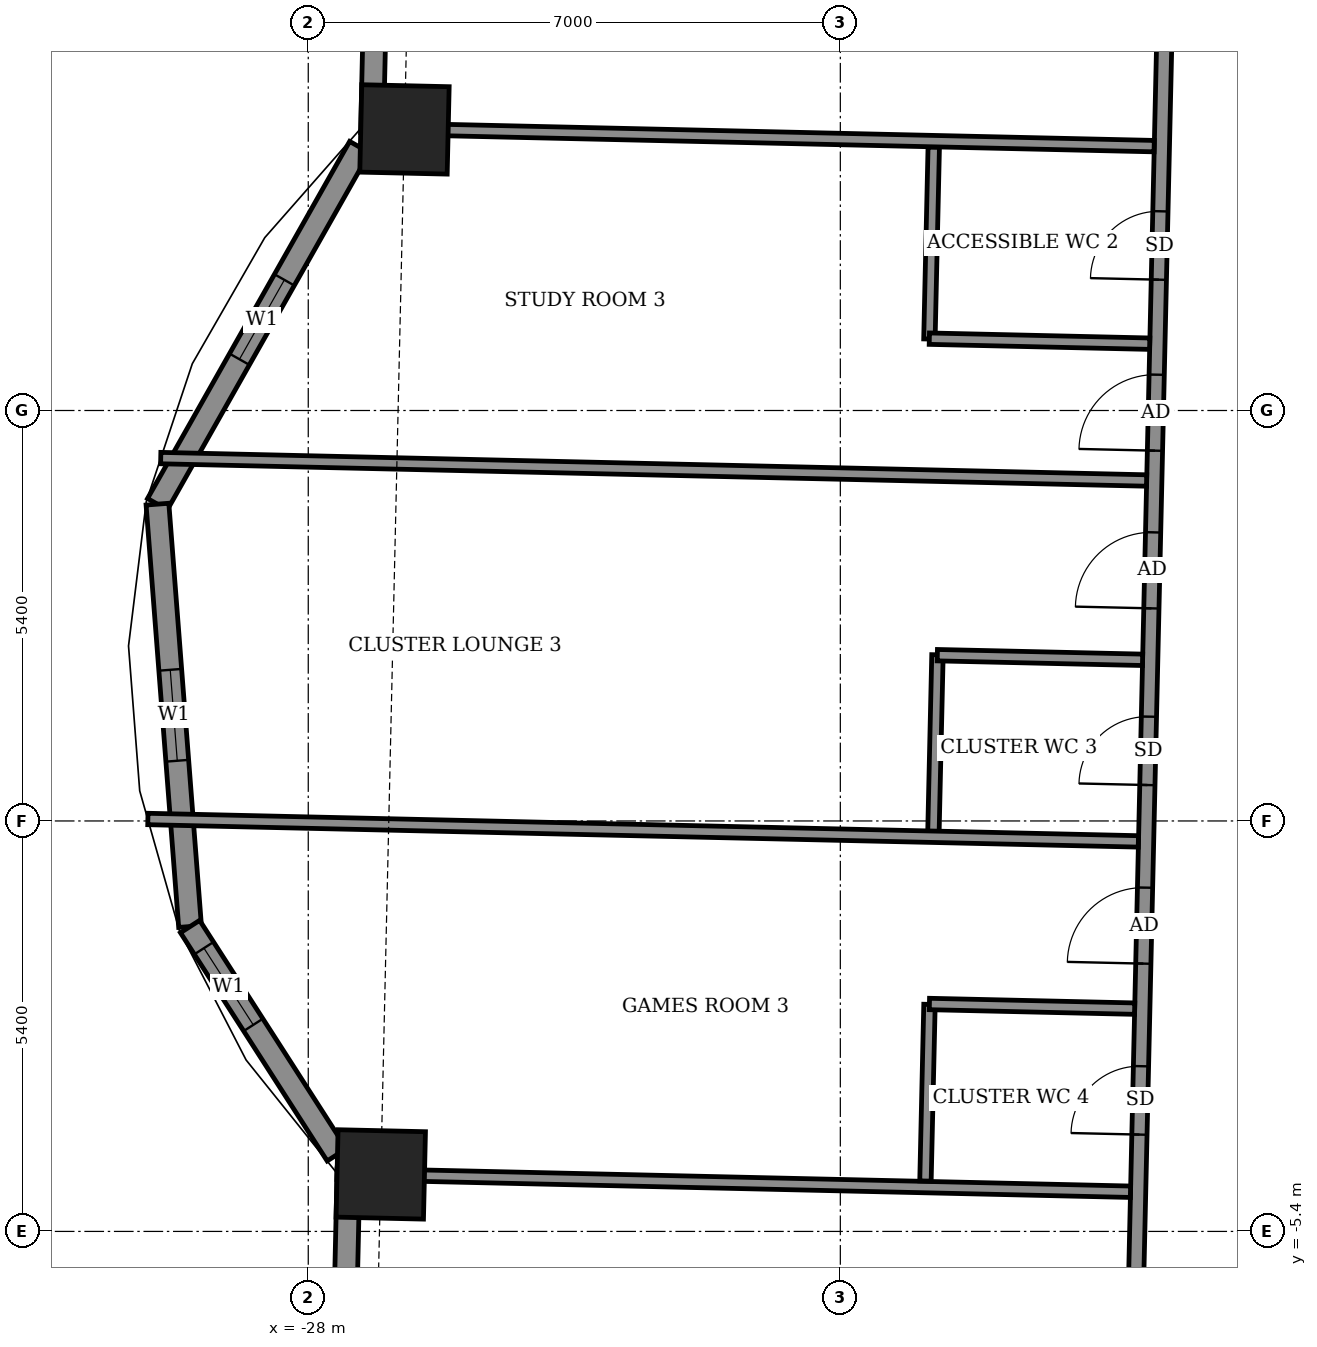
"""IFC4 building model, lengths in metres.
Left out: names, types, materials, properties, quantities, classifications, styles, units other than length and angle.
Written with IfcOpenShell. Run it as: python <this file> out.ifc"""

import sys

from ifc_helpers import new_model, si_unit, direction, frame, frame_2d, origin, origin_2d, place, context, subcontext, project, spatial, rectangle, extrude, element, fill, save


model = new_model("IFC4")
c1 = context("Model", 3, precision=1e-05, world=origin(), true_north=direction((0.0, 1.0)))
c2 = subcontext(c1, "Body", "Model", "MODEL_VIEW")
j1 = project(units=[si_unit("LENGTHUNIT", "METRE"), si_unit("PLANEANGLEUNIT", "RADIAN")], contexts=[c1])
p1 = place(None, origin())
s1 = spatial("IfcSite", under=j1, at=p1, CompositionType="ELEMENT")
p2 = place(p1, origin())
s2 = spatial("IfcBuilding", under=s1, at=p2, CompositionType="ELEMENT")
p3 = place(p2, frame((0.0, 0.0, 201.5)))
s3 = spatial("IfcBuildingStorey", under=s2, at=p3, CompositionType="ELEMENT", Elevation=201.5)
for number, where, z_axis, x_axis in (
    (1, (-27.046, -4.65, -0.55), (0.0, 0.0, 1.0), (-0.023, -1.0, 0.0)),
    (2, (-26.734, 9.098, -0.55), (0.0, 0.0, 1.0), (-0.023, -1.0, 0.0)),
):
    element("IfcColumn", number, at=place(p3, frame(where, z_axis=z_axis, x_axis=x_axis)), inside=s3, PredefinedType="COLUMN", context=c2, shape_type="SweptSolid", body=[
        extrude(rectangle(XDim=1.15, YDim=1.15, at=origin_2d()), origin(), (0.0, 0.0, 1.0), 3.6),
    ])
p4 = place(p3, frame((-26.904, 20.379, 0.0), z_axis=(0.0, 0.0, 1.0), x_axis=(-0.022669030322, -0.999743024514, 0.0)))
e3 = element("IfcWall", 3, at=p4, inside=s3, PredefinedType="SOLIDWALL", context=c2, shape_type="SweptSolid", body=[
    extrude(rectangle(XDim=11.33, YDim=0.3, at=frame_2d((5.665, 0.0))), origin(), (0.0, 0.0, 1.0), 2.55),
])
p5 = place(p4, frame((1.603, 0.0, 0.0)))
e4 = element("IfcOpeningElement", 4, at=p5, cuts=e3, PredefinedType="OPENING", context=c2, shape_type="SweptSolid", body=[
    extrude(rectangle(XDim=1.5, YDim=2.4, at=frame_2d((0.75, 1.2))), frame((0.0, 0.16, 0.0), z_axis=(0.0, -1.0, 0.0), x_axis=(1.0, 0.0, 0.0)), (0.0, 0.0, 1.0), 0.32),
])
p6 = place(p4, frame((7.218, 0.0, 0.9)))
e5 = element("IfcOpeningElement", 5, at=p6, cuts=e3, PredefinedType="OPENING", context=c2, shape_type="SweptSolid", body=[
    extrude(rectangle(XDim=2.4, YDim=1.5, at=frame_2d((1.2, 0.75))), frame((0.0, 0.16, 0.0), z_axis=(0.0, -1.0, 0.0), x_axis=(1.0, 0.0, 0.0)), (0.0, 0.0, 1.0), 0.32),
])
p7 = place(p3, frame((-27.325, 8.866, 0.0), z_axis=(0.0, 0.0, 1.0), x_axis=(-0.492554919955, -0.870281363025, 0.0)))
e6 = element("IfcWall", 6, at=p7, inside=s3, PredefinedType="SOLIDWALL", context=c2, shape_type="SweptSolid", body=[
    extrude(rectangle(XDim=5.398, YDim=0.3, at=frame_2d((2.699, 0.0))), origin(), (0.0, 0.0, 1.0), 3.05),
])
p8 = place(p7, frame((2.008, 0.0, 0.9)))
e7 = element("IfcOpeningElement", 7, at=p8, cuts=e6, PredefinedType="OPENING", context=c2, shape_type="SweptSolid", body=[
    extrude(rectangle(XDim=1.2, YDim=1.5, at=frame_2d((0.6, 0.75))), frame((0.0, 0.16, 0.0), z_axis=(0.0, -1.0, 0.0), x_axis=(1.0, 0.0, 0.0)), (0.0, 0.0, 1.0), 0.32),
])
p9 = place(p3, frame((-29.984, 4.168, 0.0), z_axis=(0.0, 0.0, 1.0), x_axis=(0.076964476481, -0.997033835614, 0.0)))
e8 = element("IfcWall", 8, at=p9, inside=s3, PredefinedType="SOLIDWALL", context=c2, shape_type="SweptSolid", body=[
    extrude(rectangle(XDim=5.573, YDim=0.3, at=frame_2d((2.787, 0.0))), origin(), (0.0, 0.0, 1.0), 3.05),
])
p10 = place(p9, frame((2.186, 0.0, 0.9)))
e9 = element("IfcOpeningElement", 9, at=p10, cuts=e8, PredefinedType="OPENING", context=c2, shape_type="SweptSolid", body=[
    extrude(rectangle(XDim=1.2, YDim=1.5, at=frame_2d((0.6, 0.75))), frame((0.0, 0.16, 0.0), z_axis=(0.0, -1.0, 0.0), x_axis=(1.0, 0.0, 0.0)), (0.0, 0.0, 1.0), 0.32),
])
p11 = place(p3, frame((-29.555, -1.389, 0.0), z_axis=(0.0, 0.0, 1.0), x_axis=(0.540622779574, -0.8412651248, 0.0)))
e10 = element("IfcWall", 10, at=p11, inside=s3, PredefinedType="SOLIDWALL", context=c2, shape_type="SweptSolid", body=[
    extrude(rectangle(XDim=3.57, YDim=0.3, at=frame_2d((1.785, 0.0))), origin(), (0.0, 0.0, 1.0), 3.05),
])
p12 = place(p11, frame((0.338, 0.0, 0.9)))
e11 = element("IfcOpeningElement", 11, at=p12, cuts=e10, PredefinedType="OPENING", context=c2, shape_type="SweptSolid", body=[
    extrude(rectangle(XDim=1.2, YDim=1.5, at=frame_2d((0.6, 0.75))), frame((0.0, 0.16, 0.0), z_axis=(0.0, -1.0, 0.0), x_axis=(1.0, 0.0, 0.0)), (0.0, 0.0, 1.0), 0.32),
])
p13 = place(p3, frame((-27.47, -4.585, 0.0), z_axis=(0.0, 0.0, 1.0), x_axis=(-0.022686419344, -0.999742630069, 0.0)))
e12 = element("IfcWall", 12, at=p13, inside=s3, PredefinedType="SOLIDWALL", context=c2, shape_type="SweptSolid", body=[
    extrude(rectangle(XDim=11.73, YDim=0.3, at=frame_2d((5.865, 0.0))), origin(), (0.0, 0.0, 1.0), 2.55),
])
p14 = place(p13, frame((2.261, 0.0, 0.0)))
e13 = element("IfcOpeningElement", 13, at=p14, cuts=e12, PredefinedType="OPENING", context=c2, shape_type="SweptSolid", body=[
    extrude(rectangle(XDim=1.5, YDim=2.4, at=frame_2d((0.75, 1.2))), frame((0.0, 0.16, 0.0), z_axis=(0.0, -1.0, 0.0), x_axis=(1.0, 0.0, 0.0)), (0.0, 0.0, 1.0), 0.32),
])
p15 = place(p13, frame((7.93, 0.0, 0.9)))
e14 = element("IfcOpeningElement", 14, at=p15, cuts=e12, PredefinedType="OPENING", context=c2, shape_type="SweptSolid", body=[
    extrude(rectangle(XDim=2.4, YDim=1.5, at=frame_2d((1.2, 0.75))), frame((0.0, 0.16, 0.0), z_axis=(0.0, -1.0, 0.0), x_axis=(1.0, 0.0, 0.0)), (0.0, 0.0, 1.0), 0.32),
])
p16 = place(p3, frame((-30.307, -7.701, 0.0), z_axis=(0.0, 0.0, 1.0), x_axis=(0.022929749512, 0.99973707873, 0.0)))
e15 = element("IfcWall", 15, at=p16, inside=s3, PredefinedType="USERDEFINED", context=c2, shape_type="SweptSolid", body=[
    extrude(rectangle(XDim=2.875, YDim=0.55, at=frame_2d((1.438, 0.0))), origin(), (0.0, 0.0, 1.0), 0.8),
])
p17 = place(p3, frame((-17.247, -12.149, 0.0), z_axis=(0.0, 0.0, 1.0), x_axis=(0.022698146637, 0.999742363881, 0.0)))
e16 = element("IfcWall", 16, at=p17, inside=s3, PredefinedType="PARTITIONING", context=c2, shape_type="SweptSolid", body=[
    extrude(rectangle(XDim=28.374, YDim=0.2, at=frame_2d((14.187, 0.0))), origin(), (0.0, 0.0, 1.0), 3.05),
])
p18 = place(p17, frame((23.0, 0.0, 0.0)))
e17 = element("IfcOpeningElement", 17, at=p18, cuts=e16, PredefinedType="OPENING", context=c2, shape_type="SweptSolid", body=[
    extrude(rectangle(XDim=1.0, YDim=2.1, at=frame_2d((0.5, 1.05))), frame((0.0, 0.11, 0.0), z_axis=(0.0, -1.0, 0.0), x_axis=(1.0, 0.0, 0.0)), (0.0, 0.0, 1.0), 0.22),
])
p19 = place(p17, frame((26.724, 0.0, 0.0)))
e18 = element("IfcOpeningElement", 18, at=p19, cuts=e16, PredefinedType="OPENING", context=c2, shape_type="SweptSolid", body=[
    extrude(rectangle(XDim=0.9, YDim=2.1, at=frame_2d((0.45, 1.05))), frame((0.0, 0.11, 0.0), z_axis=(0.0, -1.0, 0.0), x_axis=(1.0, 0.0, 0.0)), (0.0, 0.0, 1.0), 0.22),
])
p20 = place(p17, frame((17.025, 0.0, 0.0)))
e19 = element("IfcOpeningElement", 19, at=p20, cuts=e16, PredefinedType="OPENING", context=c2, shape_type="SweptSolid", body=[
    extrude(rectangle(XDim=1.0, YDim=2.1, at=frame_2d((0.5, 1.05))), frame((0.0, 0.11, 0.0), z_axis=(0.0, -1.0, 0.0), x_axis=(1.0, 0.0, 0.0)), (0.0, 0.0, 1.0), 0.22),
])
p21 = place(p17, frame((19.275, 0.0, 0.0)))
e20 = element("IfcOpeningElement", 20, at=p21, cuts=e16, PredefinedType="OPENING", context=c2, shape_type="SweptSolid", body=[
    extrude(rectangle(XDim=0.9, YDim=2.1, at=frame_2d((0.45, 1.05))), frame((0.0, 0.11, 0.0), z_axis=(0.0, -1.0, 0.0), x_axis=(1.0, 0.0, 0.0)), (0.0, 0.0, 1.0), 0.22),
])
p22 = place(p17, frame((14.95, 0.0, 0.0)))
e21 = element("IfcOpeningElement", 21, at=p22, cuts=e16, PredefinedType="OPENING", context=c2, shape_type="SweptSolid", body=[
    extrude(rectangle(XDim=1.0, YDim=2.1, at=frame_2d((0.5, 1.05))), frame((0.0, 0.11, 0.0), z_axis=(0.0, -1.0, 0.0), x_axis=(1.0, 0.0, 0.0)), (0.0, 0.0, 1.0), 0.22),
])
p23 = place(p17, frame((12.625, 0.0, 0.0)))
e22 = element("IfcOpeningElement", 22, at=p23, cuts=e16, PredefinedType="OPENING", context=c2, shape_type="SweptSolid", body=[
    extrude(rectangle(XDim=0.9, YDim=2.1, at=frame_2d((0.45, 1.05))), frame((0.0, 0.11, 0.0), z_axis=(0.0, -1.0, 0.0), x_axis=(1.0, 0.0, 0.0)), (0.0, 0.0, 1.0), 0.22),
])
p24 = place(p17, frame((10.275, 0.0, 0.0)))
e23 = element("IfcOpeningElement", 23, at=p24, cuts=e16, PredefinedType="OPENING", context=c2, shape_type="SweptSolid", body=[
    extrude(rectangle(XDim=1.0, YDim=2.1, at=frame_2d((0.5, 1.05))), frame((0.0, 0.11, 0.0), z_axis=(0.0, -1.0, 0.0), x_axis=(1.0, 0.0, 0.0)), (0.0, 0.0, 1.0), 0.22),
])
p25 = place(p17, frame((8.025, 0.0, 0.0)))
e24 = element("IfcOpeningElement", 24, at=p25, cuts=e16, PredefinedType="OPENING", context=c2, shape_type="SweptSolid", body=[
    extrude(rectangle(XDim=0.9, YDim=2.1, at=frame_2d((0.45, 1.05))), frame((0.0, 0.11, 0.0), z_axis=(0.0, -1.0, 0.0), x_axis=(1.0, 0.0, 0.0)), (0.0, 0.0, 1.0), 0.22),
])
p26 = place(p17, frame((4.337, 0.0, 0.0)))
e25 = element("IfcOpeningElement", 25, at=p26, cuts=e16, PredefinedType="OPENING", context=c2, shape_type="SweptSolid", body=[
    extrude(rectangle(XDim=1.0, YDim=2.1, at=frame_2d((0.5, 1.05))), frame((0.0, 0.11, 0.0), z_axis=(0.0, -1.0, 0.0), x_axis=(1.0, 0.0, 0.0)), (0.0, 0.0, 1.0), 0.22),
])
p27 = place(p17, frame((0.75, 0.0, 0.0)))
e26 = element("IfcOpeningElement", 26, at=p27, cuts=e16, PredefinedType="OPENING", context=c2, shape_type="SweptSolid", body=[
    extrude(rectangle(XDim=0.9, YDim=2.1, at=frame_2d((0.45, 1.05))), frame((0.0, 0.11, 0.0), z_axis=(0.0, -1.0, 0.0), x_axis=(1.0, 0.0, 0.0)), (0.0, 0.0, 1.0), 0.22),
])
p28 = place(p3, frame((-27.621, -4.641, 0.0), z_axis=(0.0, 0.0, 1.0), x_axis=(0.999742728106, -0.022682098664, 0.0)))
e27 = element("IfcWall", 27, at=p28, inside=s3, PredefinedType="PARTITIONING", context=c2, shape_type="SweptSolid", body=[
    extrude(rectangle(XDim=10.441, YDim=0.15, at=frame_2d((5.22, 0.0))), origin(), (0.0, 0.0, 1.0), 3.05),
])
p29 = place(p3, frame((-19.88, -4.737, 0.0), z_axis=(0.0, 0.0, 1.0), x_axis=(0.02279059109, 0.999740260747, 0.0)))
e28 = element("IfcWall", 28, at=p29, inside=s3, PredefinedType="PARTITIONING", context=c2, shape_type="SweptSolid", body=[
    extrude(rectangle(XDim=2.324, YDim=0.15, at=frame_2d((1.162, 0.0))), origin(), (0.0, 0.0, 1.0), 3.05),
])
p30 = place(p3, frame((-19.828, -2.408, 0.0), z_axis=(0.0, 0.0, 1.0), x_axis=(0.99974458177, -0.022600248254, 0.0)))
e29 = element("IfcWall", 29, at=p30, inside=s3, PredefinedType="PARTITIONING", context=c2, shape_type="SweptSolid", body=[
    extrude(rectangle(XDim=2.701, YDim=0.15, at=frame_2d((1.35, 0.0))), origin(), (0.0, 0.0, 1.0), 3.05),
])
p31 = place(p3, frame((-19.775, -0.138, 0.0), z_axis=(0.0, 0.0, 1.0), x_axis=(0.02279059109, 0.999740260747, 0.0)))
e30 = element("IfcWall", 30, at=p31, inside=s3, PredefinedType="PARTITIONING", context=c2, shape_type="SweptSolid", body=[
    extrude(rectangle(XDim=2.324, YDim=0.15, at=frame_2d((1.162, 0.0))), origin(), (0.0, 0.0, 1.0), 3.05),
])
p32 = place(p3, frame((-30.11, 0.026, 0.0), z_axis=(0.0, 0.0, 1.0), x_axis=(0.999743987427, -0.022626524343, 0.0)))
e31 = element("IfcWall", 31, at=p32, inside=s3, PredefinedType="PARTITIONING", context=c2, shape_type="SweptSolid", body=[
    extrude(rectangle(XDim=13.034, YDim=0.15, at=frame_2d((6.517, 0.0))), origin(), (0.0, 0.0, 1.0), 2.05),
])
p33 = place(p3, frame((-19.724, 2.181, 0.0), z_axis=(0.0, 0.0, 1.0), x_axis=(0.999746666054, -0.022507858937, 0.0)))
e32 = element("IfcWall", 32, at=p33, inside=s3, PredefinedType="PARTITIONING", context=c2, shape_type="SweptSolid", body=[
    extrude(rectangle(XDim=2.701, YDim=0.15, at=frame_2d((1.351, 0.0))), origin(), (0.0, 0.0, 1.0), 3.05),
])
p34 = place(p3, frame((-29.941, 4.774, 0.0), z_axis=(0.0, 0.0, 1.0), x_axis=(0.999741573163, -0.022732947207, 0.0)))
e33 = element("IfcWall", 33, at=p34, inside=s3, PredefinedType="PARTITIONING", context=c2, shape_type="SweptSolid", body=[
    extrude(rectangle(XDim=12.973, YDim=0.15, at=frame_2d((6.487, 0.0))), origin(), (0.0, 0.0, 1.0), 2.05),
])
p35 = place(p3, frame((-19.828, 6.34, 0.0), z_axis=(0.0, 0.0, 1.0), x_axis=(0.022532486354, 0.9997461113, 0.0)))
e34 = element("IfcWall", 34, at=p35, inside=s3, PredefinedType="PARTITIONING", context=c2, shape_type="SweptSolid", body=[
    extrude(rectangle(XDim=2.525, YDim=0.15, at=frame_2d((1.262, 0.0))), origin(), (0.0, 0.0, 1.0), 3.05),
])
p36 = place(p3, frame((-19.829, 6.345, 0.0), z_axis=(0.0, 0.0, 1.0), x_axis=(0.999741618182, -0.022730967319, 0.0)))
e35 = element("IfcWall", 35, at=p36, inside=s3, PredefinedType="PARTITIONING", context=c2, shape_type="SweptSolid", body=[
    extrude(rectangle(XDim=2.9, YDim=0.15, at=frame_2d((1.45, 0.0))), origin(), (0.0, 0.0, 1.0), 3.05),
])
p37 = place(p3, frame((-27.01, 9.108, 0.0), z_axis=(0.0, 0.0, 1.0), x_axis=(0.999742841246, -0.022677111331, 0.0)))
e36 = element("IfcWall", 36, at=p37, inside=s3, PredefinedType="PARTITIONING", context=c2, shape_type="SweptSolid", body=[
    extrude(rectangle(XDim=10.142, YDim=0.15, at=frame_2d((5.071, 0.0))), origin(), (0.0, 0.0, 1.0), 3.05),
])
p38 = place(p8, origin())
e37 = element("IfcWindow", 37, at=p38, inside=s3, PartitioningType="SINGLE_PANEL", PredefinedType="WINDOW", context=c2, shape_type="SweptSolid", body=[
    extrude(rectangle(XDim=1.2, YDim=1.5, at=frame_2d((0.6, 0.75))), frame((0.0, 0.03, 0.0), z_axis=(0.0, -1.0, 0.0), x_axis=(1.0, 0.0, 0.0)), (0.0, 0.0, 1.0), 0.06),
])
fill(e7, e37)
p39 = place(p10, origin())
e38 = element("IfcWindow", 38, at=p39, inside=s3, PartitioningType="SINGLE_PANEL", PredefinedType="WINDOW", context=c2, shape_type="SweptSolid", body=[
    extrude(rectangle(XDim=1.2, YDim=1.5, at=frame_2d((0.6, 0.75))), frame((0.0, 0.03, 0.0), z_axis=(0.0, -1.0, 0.0), x_axis=(1.0, 0.0, 0.0)), (0.0, 0.0, 1.0), 0.06),
])
fill(e9, e38)
p40 = place(p12, origin())
e39 = element("IfcWindow", 39, at=p40, inside=s3, PartitioningType="SINGLE_PANEL", PredefinedType="WINDOW", context=c2, shape_type="SweptSolid", body=[
    extrude(rectangle(XDim=1.2, YDim=1.5, at=frame_2d((0.6, 0.75))), frame((0.0, 0.03, 0.0), z_axis=(0.0, -1.0, 0.0), x_axis=(1.0, 0.0, 0.0)), (0.0, 0.0, 1.0), 0.06),
])
fill(e11, e39)
p41 = place(p20, origin())
e40 = element("IfcDoor", 40, at=p41, inside=s3, OperationType="SINGLE_SWING_RIGHT", PredefinedType="DOOR", context=c2, shape_type="SweptSolid", body=[
    extrude(rectangle(XDim=1.0, YDim=2.1, at=frame_2d((0.5, 1.05))), frame((0.0, 0.025, 0.0), z_axis=(0.0, -1.0, 0.0), x_axis=(1.0, 0.0, 0.0)), (0.0, 0.0, 1.0), 0.05),
])
fill(e19, e40)
p42 = place(p21, origin())
e41 = element("IfcDoor", 41, at=p42, inside=s3, OperationType="SINGLE_SWING_LEFT", PredefinedType="DOOR", context=c2, shape_type="SweptSolid", body=[
    extrude(rectangle(XDim=0.9, YDim=2.1, at=frame_2d((0.45, 1.05))), frame((0.0, 0.025, 0.0), z_axis=(0.0, -1.0, 0.0), x_axis=(1.0, 0.0, 0.0)), (0.0, 0.0, 1.0), 0.05),
])
fill(e20, e41)
p43 = place(p22, origin())
e42 = element("IfcDoor", 42, at=p43, inside=s3, OperationType="SINGLE_SWING_LEFT", PredefinedType="DOOR", context=c2, shape_type="SweptSolid", body=[
    extrude(rectangle(XDim=1.0, YDim=2.1, at=frame_2d((0.5, 1.05))), frame((0.0, 0.025, 0.0), z_axis=(0.0, -1.0, 0.0), x_axis=(1.0, 0.0, 0.0)), (0.0, 0.0, 1.0), 0.05),
])
fill(e21, e42)
p44 = place(p23, origin())
e43 = element("IfcDoor", 43, at=p44, inside=s3, OperationType="SINGLE_SWING_RIGHT", PredefinedType="DOOR", context=c2, shape_type="SweptSolid", body=[
    extrude(rectangle(XDim=0.9, YDim=2.1, at=frame_2d((0.45, 1.05))), frame((0.0, 0.025, 0.0), z_axis=(0.0, -1.0, 0.0), x_axis=(1.0, 0.0, 0.0)), (0.0, 0.0, 1.0), 0.05),
])
fill(e22, e43)
p45 = place(p24, origin())
e44 = element("IfcDoor", 44, at=p45, inside=s3, OperationType="SINGLE_SWING_RIGHT", PredefinedType="DOOR", context=c2, shape_type="SweptSolid", body=[
    extrude(rectangle(XDim=1.0, YDim=2.1, at=frame_2d((0.5, 1.05))), frame((0.0, 0.025, 0.0), z_axis=(0.0, -1.0, 0.0), x_axis=(1.0, 0.0, 0.0)), (0.0, 0.0, 1.0), 0.05),
])
fill(e23, e44)
p46 = place(p25, origin())
e45 = element("IfcDoor", 45, at=p46, inside=s3, OperationType="SINGLE_SWING_LEFT", PredefinedType="DOOR", context=c2, shape_type="SweptSolid", body=[
    extrude(rectangle(XDim=0.9, YDim=2.1, at=frame_2d((0.45, 1.05))), frame((0.0, 0.025, 0.0), z_axis=(0.0, -1.0, 0.0), x_axis=(1.0, 0.0, 0.0)), (0.0, 0.0, 1.0), 0.05),
])
fill(e24, e45)
save(model, sys.argv[1])
